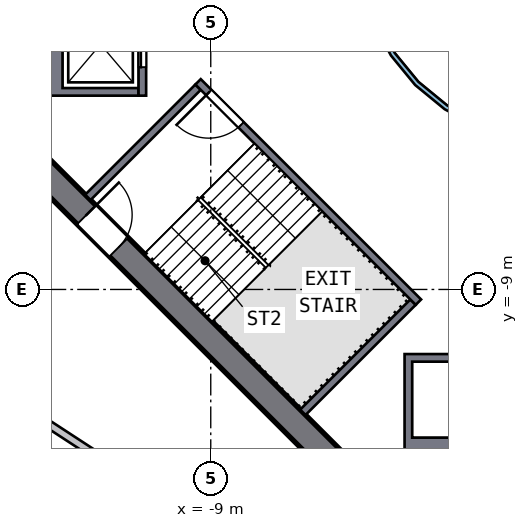
"""IFC4 building model, lengths in metres.
Left out: names, types, materials, properties, quantities, classifications, styles, units other than length and angle.
Written with IfcOpenShell. Run it as: python <this file> out.ifc"""

import sys

from ifc_helpers import new_model, si_unit, direction, frame, frame_2d, origin, place, context, subcontext, project, spatial, polyline, rectangle, outline, extrude, element, fill, save


model = new_model("IFC4")
c1 = context("Model", 3, precision=1e-05, world=origin(), true_north=direction((0.0, 1.0)))
c2 = subcontext(c1, "Body", "Model", "MODEL_VIEW")
j1 = project(units=[si_unit("LENGTHUNIT", "METRE"), si_unit("PLANEANGLEUNIT", "RADIAN")], contexts=[c1])
p1 = place(None, origin())
s1 = spatial("IfcSite", under=j1, at=p1, CompositionType="ELEMENT")
p2 = place(p1, origin())
s2 = spatial("IfcBuilding", under=s1, at=p2, CompositionType="ELEMENT")
p3 = place(p2, frame((0.0, 0.0, 143.5)))
s3 = spatial("IfcBuildingStorey", under=s2, at=p3, CompositionType="ELEMENT", Elevation=143.5)
p4 = place(p3, frame((-13.752, -5.552, 0.0), z_axis=(0.0, 0.0, 1.0), x_axis=(0.707106781, -0.707106781, 0.0)))
e1 = element("IfcWall", 1, at=p4, inside=s3, PredefinedType="SHEAR", context=c2, shape_type="SweptSolid", body=[
    extrude(rectangle(XDim=11.598, YDim=0.7, at=frame_2d((5.799, 0.0))), origin(), (0.0, 0.0, 1.0), 3.5),
])
p5 = place(p4, frame((2.099, 0.0, 0.0)))
e2 = element("IfcOpeningElement", 2, at=p5, cuts=e1, PredefinedType="OPENING", context=c2, shape_type="SweptSolid", body=[
    extrude(rectangle(XDim=1.2, YDim=2.1, at=frame_2d((0.6, 1.05))), frame((0.0, 0.36, 0.0), z_axis=(0.0, -1.0, 0.0), x_axis=(1.0, 0.0, 0.0)), (0.0, 0.0, 1.0), 0.72),
])
p6 = place(p3, origin())
e3 = element("IfcWall", 3, at=p6, inside=s3, PredefinedType="SOLIDWALL", context=c2, shape_type="SweptSolid", body=[
    extrude(outline(polyline([(-13.3, -3.9), (-13.3, -1.2), (-10.9, -1.2), (-10.9, -1.4), (-12.9, -1.4), (-12.9, -3.7), (-10.9, -3.7), (-10.9, -3.9), (-13.3, -3.9)])), origin(), (0.0, 0.0, 1.0), 3.19),
])
p7 = place(p3, frame((-10.8, -1.2, 0.0), z_axis=(0.0, 0.0, 1.0), x_axis=(0.0, -1.0, 0.0)))
e4 = element("IfcWall", 4, at=p7, inside=s3, PredefinedType="SOLIDWALL", context=c2, shape_type="SweptSolid", body=[
    extrude(rectangle(XDim=2.7, YDim=0.2, at=frame_2d((1.35, 0.0))), origin(), (0.0, 0.0, 1.0), 3.19),
])
p8 = place(p7, frame((0.75, 0.0, 0.0)))
e5 = element("IfcOpeningElement", 5, at=p8, cuts=e4, PredefinedType="OPENING", context=c2, shape_type="SweptSolid", body=[
    extrude(rectangle(XDim=1.2, YDim=2.1, at=frame_2d((0.6, 1.05))), frame((0.0, 0.11, 0.0), z_axis=(0.0, -1.0, 0.0), x_axis=(1.0, 0.0, 0.0)), (0.0, 0.0, 1.0), 0.22),
])
p9 = place(p3, origin())
e6 = element("IfcWall", 6, at=p9, inside=s3, PredefinedType="SOLIDWALL", context=c2, shape_type="SweptSolid", body=[
    extrude(outline(polyline([(-1.2, -13.3), (-3.9, -13.3), (-3.9, -10.7), (-1.2, -10.7), (-1.2, -13.3)]), holes=[polyline([(-3.7, -10.9), (-3.7, -12.9), (-1.4, -12.9), (-1.4, -10.9), (-3.7, -10.9)])]), origin(), (0.0, 0.0, 1.0), 3.19),
])
p10 = place(p3, frame((-3.535, -9.334, 0.0), z_axis=(0.0, 0.0, 1.0), x_axis=(-0.707106781, 0.707106781, 0.0)))
e7 = element("IfcWall", 7, at=p10, inside=s3, PredefinedType="SOLIDWALL", context=c2, shape_type="SweptSolid", body=[
    extrude(rectangle(XDim=8.2, YDim=0.2, at=frame_2d((4.1, 0.0))), origin(), (0.0, 0.0, 1.0), 3.19),
])
p11 = place(p10, frame((6.6, 0.0, 0.0)))
e8 = element("IfcOpeningElement", 8, at=p11, cuts=e7, PredefinedType="OPENING", context=c2, shape_type="SweptSolid", body=[
    extrude(rectangle(XDim=1.2, YDim=2.1, at=frame_2d((0.6, 1.05))), frame((0.0, 0.11, 0.0), z_axis=(0.0, -1.0, 0.0), x_axis=(1.0, 0.0, 0.0)), (0.0, 0.0, 1.0), 0.22),
])
for number, where, z_axis, x_axis in (
    (9, (-9.334, -3.677, 0.0), (0.0, 0.0, 1.0), (-0.707, -0.707, 0.0)),
    (10, (-3.677, -9.334, 0.0), (0.0, 0.0, 1.0), (-0.707, -0.707, 0.0)),
):
    element("IfcWall", number, at=place(p3, frame(where, z_axis=z_axis, x_axis=x_axis)), inside=s3, PredefinedType="SOLIDWALL", context=c2, shape_type="SweptSolid", body=[
        extrude(rectangle(XDim=4.1, YDim=0.2, at=frame_2d((2.05, 0.0))), origin(), (0.0, 0.0, 1.0), 3.19),
    ])
p12 = place(p3, origin())
e11 = element("IfcWall", 11, at=p12, inside=s3, PredefinedType="SOLIDWALL", context=c2, shape_type="SweptSolid", body=[
    extrude(outline(polyline([(5.021, -0.999), (4.73, -1.959), (4.257, -2.844), (3.62, -3.62), (2.844, -4.257), (1.959, -4.73), (0.999, -5.021), (0.0, -5.12), (-0.999, -5.021), (-1.959, -4.73), (-2.844, -4.257), (-3.62, -3.62), (-4.257, -2.844), (-4.73, -1.959), (-5.021, -0.999), (-5.12, 0.0), (-5.021, 0.999), (-4.73, 1.959), (-4.257, 2.844), (-3.62, 3.62), (-2.844, 4.257), (-1.959, 4.73), (-0.999, 5.021), (0.0, 5.12), (0.999, 5.021), (1.959, 4.73), (2.844, 4.257), (3.62, 3.62), (4.257, 2.844), (4.73, 1.959), (5.021, 0.999), (5.12, 0.0), (5.021, -0.999)]), holes=[polyline([(4.904, 0.976), (4.619, 1.913), (4.157, 2.778), (3.535, 3.535), (2.778, 4.157), (1.913, 4.619), (0.976, 4.904), (0.0, 5.0), (-0.976, 4.904), (-1.913, 4.619), (-2.778, 4.157), (-3.535, 3.535), (-4.157, 2.778), (-4.619, 1.913), (-4.904, 0.976), (-5.0, 0.0), (-4.904, -0.976), (-4.619, -1.913), (-4.157, -2.778), (-3.535, -3.535), (-2.778, -4.157), (-1.913, -4.619), (-0.976, -4.904), (0.0, -5.0), (0.976, -4.904), (1.913, -4.619), (2.778, -4.157), (3.535, -3.535), (4.157, -2.778), (4.619, -1.913), (4.904, -0.976), (5.0, 0.0), (4.904, 0.976)])]), origin(), (0.0, 0.0, 1.0), 3.19),
])
p13 = place(p3, frame((-13.472, -12.414, 0.0), z_axis=(0.0, 0.0, 1.0), x_axis=(0.837510592, -0.546421091, 0.0)))
e12 = element("IfcWall", 12, at=p13, inside=s3, PredefinedType="SOLIDWALL", context=c2, shape_type="SweptSolid", body=[
    extrude(rectangle(XDim=3.4, YDim=0.2, at=frame_2d((1.7, 0.0))), origin(), (0.0, 0.0, 1.0), 3.19),
])
p14 = place(p8, origin())
e13 = element("IfcDoor", 13, at=p14, inside=s3, OperationType="DOUBLE_DOOR_SLIDING", PredefinedType="DOOR", context=c2, shape_type="SweptSolid", body=[
    extrude(rectangle(XDim=1.2, YDim=2.1, at=frame_2d((0.6, 1.05))), frame((0.0, 0.025, 0.0), z_axis=(0.0, -1.0, 0.0), x_axis=(1.0, 0.0, 0.0)), (0.0, 0.0, 1.0), 0.05),
])
fill(e5, e13)
p15 = place(p11, origin())
e14 = element("IfcDoor", 14, at=p15, inside=s3, OperationType="SINGLE_SWING_RIGHT", PredefinedType="DOOR", context=c2, shape_type="SweptSolid", body=[
    extrude(rectangle(XDim=1.2, YDim=2.1, at=frame_2d((0.6, 1.05))), frame((0.0, 0.025, 0.0), z_axis=(0.0, -1.0, 0.0), x_axis=(1.0, 0.0, 0.0)), (0.0, 0.0, 1.0), 0.05),
])
fill(e8, e14)
p16 = place(p5, origin())
e15 = element("IfcDoor", 15, at=p16, inside=s3, OperationType="SINGLE_SWING_LEFT", PredefinedType="DOOR", context=c2, shape_type="SweptSolid", body=[
    extrude(rectangle(XDim=1.2, YDim=2.1, at=frame_2d((0.6, 1.05))), frame((0.0, 0.025, 0.0), z_axis=(0.0, -1.0, 0.0), x_axis=(1.0, 0.0, 0.0)), (0.0, 0.0, 1.0), 0.05),
])
fill(e2, e15)
save(model, sys.argv[1])
